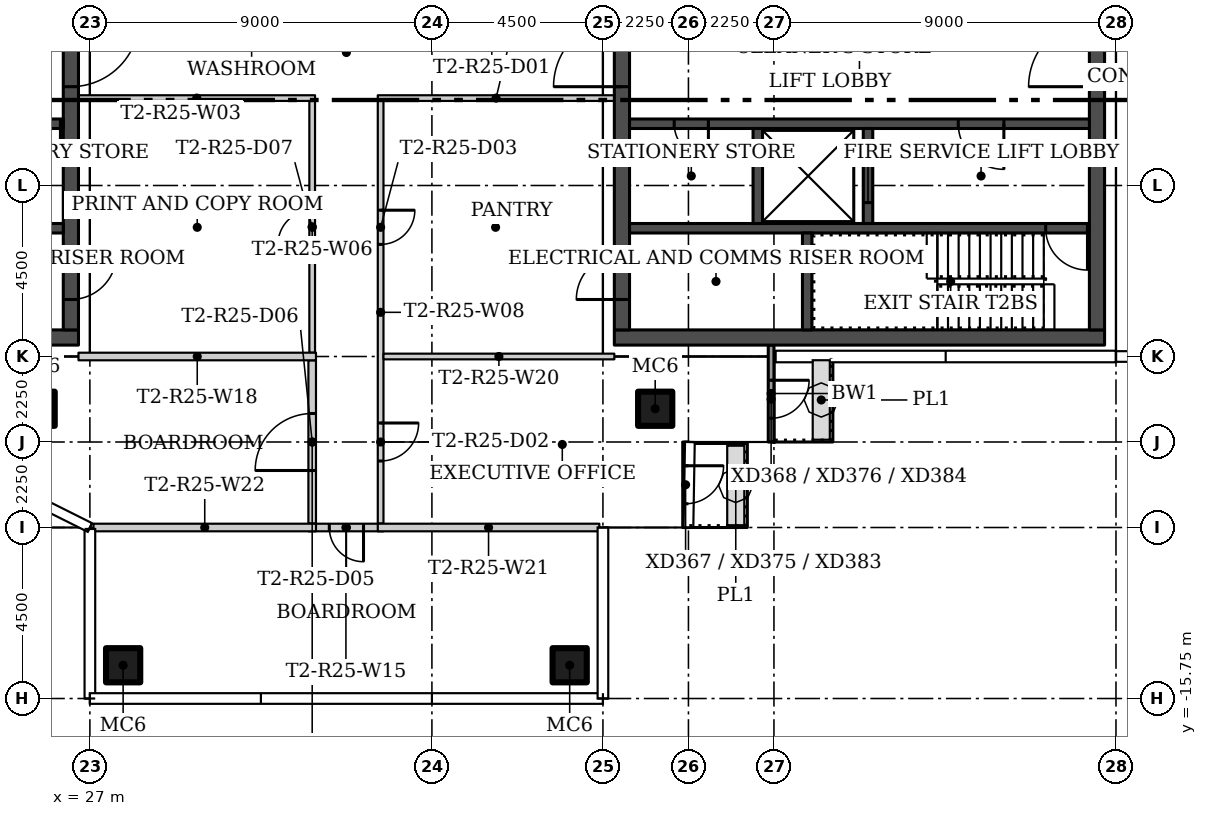
"""IFC4 building model, lengths in metres.
Left out: names, types, materials, properties, quantities, classifications, styles, units other than length and angle.
Written with IfcOpenShell. Run it as: python <this file> out.ifc"""

import sys

from ifc_helpers import new_model, si_unit, direction, frame, frame_2d, origin, origin_2d, place, context, subcontext, project, spatial, rectangle, hollow_rectangle, extrude, element, fill, save


model = new_model("IFC4")
c1 = context("Model", 3, precision=1e-05, world=origin(), true_north=direction((0.0, 1.0)))
c2 = subcontext(c1, "Body", "Model", "MODEL_VIEW")
j1 = project(units=[si_unit("LENGTHUNIT", "METRE"), si_unit("PLANEANGLEUNIT", "RADIAN")], contexts=[c1])
p1 = place(None, origin())
s1 = spatial("IfcSite", under=j1, at=p1, CompositionType="ELEMENT")
p2 = place(p1, origin())
s2 = spatial("IfcBuilding", under=s1, at=p2, CompositionType="ELEMENT")
p3 = place(p2, frame((0.0, 0.0, 230.4)))
s3 = spatial("IfcBuildingStorey", under=s2, at=p3, CompositionType="ELEMENT", Elevation=230.4)
for number, where in (
    (1, (25.625, -8.125, 0.0)),
    (2, (41.875, -8.125, 0.0)),
    (3, (39.625, -14.875, 0.0)),
    (4, (27.875, -14.875, 0.0)),
):
    element("IfcColumn", number, at=place(p3, frame(where)), inside=s3, PredefinedType="COLUMN", context=c2, shape_type="SweptSolid", body=[
        extrude(hollow_rectangle(XDim=0.9, YDim=0.9, WallThickness=0.036, at=origin_2d()), origin(), (0.0, 0.0, 1.0), 3.55),
    ])
for number, where, z_axis, x_axis in (
    (5, (32.925, 0.05, 0.0), (0.0, 0.0, 1.0), (-1.0, 0.0, 0.0)),
    (6, (40.8, 0.05, 0.0), (0.0, 0.0, 1.0), (-1.0, 0.0, 0.0)),
):
    element("IfcWall", number, at=place(p3, frame(where, z_axis=z_axis, x_axis=x_axis)), inside=s3, PredefinedType="PARTITIONING", context=c2, shape_type="SweptSolid", body=[
        extrude(rectangle(XDim=6.225, YDim=0.15, at=frame_2d((3.112, 0.0))), origin(), (0.0, 0.0, 1.0), 3.55),
    ])
p4 = place(p3, frame((32.85, -6.65, 0.0), z_axis=(0.0, 0.0, 1.0), x_axis=(0.0, 1.0, 0.0)))
e7 = element("IfcWall", 7, at=p4, inside=s3, PredefinedType="PARTITIONING", context=c2, shape_type="SweptSolid", body=[
    extrude(rectangle(XDim=6.625, YDim=0.15, at=frame_2d((3.312, 0.0))), origin(), (0.0, 0.0, 1.0), 3.55),
])
p5 = place(p4, frame((2.85, 0.0, 0.0)))
e8 = element("IfcOpeningElement", 8, at=p5, cuts=e7, PredefinedType="OPENING", context=c2, shape_type="SweptSolid", body=[
    extrude(rectangle(XDim=0.9, YDim=2.1, at=frame_2d((0.45, 1.05))), frame((0.0, 0.085, 0.0), z_axis=(0.0, -1.0, 0.0), x_axis=(1.0, 0.0, 0.0)), (0.0, 0.0, 1.0), 0.17),
])
p6 = place(p3, frame((34.65, -0.025, 0.0), z_axis=(0.0, 0.0, 1.0), x_axis=(0.0, -1.0, 0.0)))
e9 = element("IfcWall", 9, at=p6, inside=s3, PredefinedType="PARTITIONING", context=c2, shape_type="SweptSolid", body=[
    extrude(rectangle(XDim=11.125, YDim=0.15, at=frame_2d((5.562, 0.0))), origin(), (0.0, 0.0, 1.0), 3.55),
])
p7 = place(p6, frame((8.475, 0.0, 0.0)))
e10 = element("IfcOpeningElement", 10, at=p7, cuts=e9, PredefinedType="OPENING", context=c2, shape_type="SweptSolid", body=[
    extrude(rectangle(XDim=1.0, YDim=2.4, at=frame_2d((0.5, 1.2))), frame((0.0, 0.085, 0.0), z_axis=(0.0, -1.0, 0.0), x_axis=(1.0, 0.0, 0.0)), (0.0, 0.0, 1.0), 0.17),
])
p8 = place(p6, frame((2.875, 0.0, 0.0)))
e11 = element("IfcOpeningElement", 11, at=p8, cuts=e9, PredefinedType="OPENING", context=c2, shape_type="SweptSolid", body=[
    extrude(rectangle(XDim=0.9, YDim=2.1, at=frame_2d((0.45, 1.05))), frame((0.0, 0.085, 0.0), z_axis=(0.0, -1.0, 0.0), x_axis=(1.0, 0.0, 0.0)), (0.0, 0.0, 1.0), 0.17),
])
p9 = place(p3, frame((32.85, -11.15, 0.0), z_axis=(0.0, 0.0, 1.0), x_axis=(0.0, 1.0, 0.0)))
e12 = element("IfcWall", 12, at=p9, inside=s3, PredefinedType="PARTITIONING", context=c2, shape_type="SweptSolid", body=[
    extrude(rectangle(XDim=4.3, YDim=0.2, at=frame_2d((2.15, 0.0))), origin(), (0.0, 0.0, 1.0), 3.55),
])
p10 = place(p9, frame((1.4, 0.0, 0.0)))
e13 = element("IfcOpeningElement", 13, at=p10, cuts=e12, PredefinedType="OPENING", context=c2, shape_type="SweptSolid", body=[
    extrude(rectangle(XDim=1.5, YDim=2.4, at=frame_2d((0.75, 1.2))), frame((0.0, 0.11, 0.0), z_axis=(0.0, -1.0, 0.0), x_axis=(1.0, 0.0, 0.0)), (0.0, 0.0, 1.0), 0.22),
])
p11 = place(p3, frame((34.725, -11.25, 0.0), z_axis=(0.0, 0.0, 1.0), x_axis=(-1.0, 0.0, 0.0)))
e14 = element("IfcWall", 14, at=p11, inside=s3, PredefinedType="PARTITIONING", context=c2, shape_type="SweptSolid", body=[
    extrude(rectangle(XDim=1.976, YDim=0.2, at=frame_2d((0.988, 0.0))), origin(), (0.0, 0.0, 1.0), 3.55),
])
p12 = place(p11, frame((0.525, 0.0, 0.0)))
e15 = element("IfcOpeningElement", 15, at=p12, cuts=e14, PredefinedType="OPENING", context=c2, shape_type="SweptSolid", body=[
    extrude(rectangle(XDim=0.9, YDim=2.4, at=frame_2d((0.45, 1.2))), frame((0.0, 0.11, 0.0), z_axis=(0.0, -1.0, 0.0), x_axis=(1.0, 0.0, 0.0)), (0.0, 0.0, 1.0), 0.22),
])
p13 = place(p3, frame((26.7, -6.75, 0.0)))
e16 = element("IfcWall", 16, at=p13, inside=s3, PredefinedType="PARTITIONING", context=c2, shape_type="SweptSolid", body=[
    extrude(rectangle(XDim=6.25, YDim=0.2, at=frame_2d((3.125, 0.0))), origin(), (0.0, 0.0, 1.0), 3.55),
])
p14 = place(p3, frame((34.725, -6.75, 0.0)))
e17 = element("IfcWall", 17, at=p14, inside=s3, PredefinedType="PARTITIONING", context=c2, shape_type="SweptSolid", body=[
    extrude(rectangle(XDim=6.075, YDim=0.15, at=frame_2d((3.037, 0.0))), origin(), (0.0, 0.0, 1.0), 3.55),
])
p15 = place(p3, frame((34.575, -11.25, 0.0)))
e18 = element("IfcWall", 18, at=p15, inside=s3, PredefinedType="PARTITIONING", context=c2, shape_type="SweptSolid", body=[
    extrude(rectangle(XDim=5.83, YDim=0.2, at=frame_2d((2.915, 0.0))), origin(), (0.0, 0.0, 1.0), 3.55),
])
p16 = place(p3, frame((27.095, -11.25, 0.0)))
e19 = element("IfcWall", 19, at=p16, inside=s3, PredefinedType="PARTITIONING", context=c2, shape_type="SweptSolid", body=[
    extrude(rectangle(XDim=5.855, YDim=0.2, at=frame_2d((2.927, 0.0))), origin(), (0.0, 0.0, 1.0), 3.55),
])
p17 = place(p3, frame((42.675, -9.0, 0.0), z_axis=(0.0, 0.0, 1.0), x_axis=(0.0, -1.0, 0.0)))
e20 = element("IfcWall", 20, at=p17, inside=s3, PredefinedType="SOLIDWALL", context=c2, shape_type="SweptSolid", body=[
    extrude(rectangle(XDim=2.25, YDim=0.15, at=frame_2d((1.125, 0.0))), origin(), (0.0, 0.0, 1.0), 3.45),
])
p18 = place(p17, frame((0.625, 0.0, 0.0)))
e21 = element("IfcOpeningElement", 21, at=p18, cuts=e20, PredefinedType="OPENING", context=c2, shape_type="SweptSolid", body=[
    extrude(rectangle(XDim=1.0, YDim=2.4, at=frame_2d((0.5, 1.2))), frame((0.0, 0.085, 0.0), z_axis=(0.0, -1.0, 0.0), x_axis=(1.0, 0.0, 0.0)), (0.0, 0.0, 1.0), 0.17),
])
p19 = place(p3, frame((44.925, -6.448, 0.0), z_axis=(0.0, 0.0, 1.0), x_axis=(0.0, -1.0, 0.0)))
e22 = element("IfcWall", 22, at=p19, inside=s3, PredefinedType="SOLIDWALL", context=c2, shape_type="SweptSolid", body=[
    extrude(rectangle(XDim=2.552, YDim=0.15, at=frame_2d((1.276, 0.0))), origin(), (0.0, 0.0, 1.0), 3.45),
])
p20 = place(p19, frame((0.927, 0.0, 0.0)))
e23 = element("IfcOpeningElement", 23, at=p20, cuts=e22, PredefinedType="OPENING", context=c2, shape_type="SweptSolid", body=[
    extrude(rectangle(XDim=1.0, YDim=2.4, at=frame_2d((0.5, 1.2))), frame((0.0, 0.085, 0.0), z_axis=(0.0, -1.0, 0.0), x_axis=(1.0, 0.0, 0.0)), (0.0, 0.0, 1.0), 0.17),
])
p21 = place(p3, frame((13.8, -6.25, 0.0)))
e24 = element("IfcWall", 24, at=p21, inside=s3, PredefinedType="SHEAR", context=c2, shape_type="SweptSolid", body=[
    extrude(rectangle(XDim=12.9, YDim=0.4, at=frame_2d((6.45, 0.0))), origin(), (0.0, 0.0, 1.0), 3.55),
])
p22 = place(p3, frame((26.5, 6.05, 0.0), z_axis=(0.0, 0.0, 1.0), x_axis=(0.0, -1.0, 0.0)))
e25 = element("IfcWall", 25, at=p22, inside=s3, PredefinedType="SHEAR", context=c2, shape_type="SweptSolid", body=[
    extrude(rectangle(XDim=12.1, YDim=0.4, at=frame_2d((6.05, 0.0))), origin(), (0.0, 0.0, 1.0), 3.55),
])
p23 = place(p22, frame((10.1, 0.0, 0.0)))
e26 = element("IfcOpeningElement", 26, at=p23, cuts=e25, PredefinedType="OPENING", context=c2, shape_type="SweptSolid", body=[
    extrude(rectangle(XDim=1.2, YDim=2.1, at=frame_2d((0.6, 1.05))), frame((0.0, 0.21, 0.0), z_axis=(0.0, -1.0, 0.0), x_axis=(1.0, 0.0, 0.0)), (0.0, 0.0, 1.0), 0.42),
])
p24 = place(p22, frame((3.9, 0.0, 0.0)))
e27 = element("IfcOpeningElement", 27, at=p24, cuts=e25, PredefinedType="OPENING", context=c2, shape_type="SweptSolid", body=[
    extrude(rectangle(XDim=1.8, YDim=2.4, at=frame_2d((0.9, 1.2))), frame((0.0, 0.21, 0.0), z_axis=(0.0, -1.0, 0.0), x_axis=(1.0, 0.0, 0.0)), (0.0, 0.0, 1.0), 0.42),
])
p25 = place(p3, frame((26.3, -3.375, 0.0), z_axis=(0.0, 0.0, 1.0), x_axis=(-1.0, 0.0, 0.0)))
e28 = element("IfcWall", 28, at=p25, inside=s3, PredefinedType="SHEAR", context=c2, shape_type="SweptSolid", body=[
    extrude(rectangle(XDim=12.1, YDim=0.25, at=frame_2d((6.05, 0.0))), origin(), (0.0, 0.0, 1.0), 3.55),
])
p26 = place(p25, frame((10.95, 0.0, 0.0)))
e29 = element("IfcOpeningElement", 29, at=p26, cuts=e28, PredefinedType="OPENING", context=c2, shape_type="SweptSolid", body=[
    extrude(rectangle(XDim=1.1, YDim=2.1, at=frame_2d((0.55, 1.05))), frame((0.0, 0.135, 0.0), z_axis=(0.0, -1.0, 0.0), x_axis=(1.0, 0.0, 0.0)), (0.0, 0.0, 1.0), 0.27),
])
p27 = place(p3, frame((26.3, -0.625, 0.0), z_axis=(0.0, 0.0, 1.0), x_axis=(-1.0, 0.0, 0.0)))
e30 = element("IfcWall", 30, at=p27, inside=s3, PredefinedType="SHEAR", context=c2, shape_type="SweptSolid", body=[
    extrude(rectangle(XDim=12.1, YDim=0.25, at=frame_2d((6.05, 0.0))), origin(), (0.0, 0.0, 1.0), 3.55),
])
p28 = place(p27, frame((8.65, 0.0, 0.0)))
e31 = element("IfcOpeningElement", 31, at=p28, cuts=e30, PredefinedType="OPENING", context=c2, shape_type="SweptSolid", body=[
    extrude(rectangle(XDim=1.2, YDim=2.1, at=frame_2d((0.6, 1.05))), frame((0.0, 0.135, 0.0), z_axis=(0.0, -1.0, 0.0), x_axis=(1.0, 0.0, 0.0)), (0.0, 0.0, 1.0), 0.27),
])
p29 = place(p27, frame((1.7, 0.0, 0.0)))
e32 = element("IfcOpeningElement", 32, at=p29, cuts=e30, PredefinedType="OPENING", context=c2, shape_type="SweptSolid", body=[
    extrude(rectangle(XDim=0.9, YDim=2.1, at=frame_2d((0.45, 1.05))), frame((0.0, 0.135, 0.0), z_axis=(0.0, -1.0, 0.0), x_axis=(1.0, 0.0, 0.0)), (0.0, 0.0, 1.0), 0.27),
])
p30 = place(p27, frame((0.075, 0.0, 0.0)))
e33 = element("IfcOpeningElement", 33, at=p30, cuts=e30, PredefinedType="OPENING", context=c2, shape_type="SweptSolid", body=[
    extrude(rectangle(XDim=0.9, YDim=2.1, at=frame_2d((0.45, 1.05))), frame((0.0, 0.135, 0.0), z_axis=(0.0, -1.0, 0.0), x_axis=(1.0, 0.0, 0.0)), (0.0, 0.0, 1.0), 0.27),
])
p31 = place(p3, frame((53.7, -6.25, 0.0), z_axis=(0.0, 0.0, 1.0), x_axis=(-1.0, 0.0, 0.0)))
e34 = element("IfcWall", 34, at=p31, inside=s3, PredefinedType="SHEAR", context=c2, shape_type="SweptSolid", body=[
    extrude(rectangle(XDim=12.9, YDim=0.4, at=frame_2d((6.45, 0.0))), origin(), (0.0, 0.0, 1.0), 3.55),
])
p32 = place(p3, frame((53.5, -6.05, 0.0), z_axis=(0.0, 0.0, 1.0), x_axis=(0.0, 1.0, 0.0)))
e35 = element("IfcWall", 35, at=p32, inside=s3, PredefinedType="SHEAR", context=c2, shape_type="SweptSolid", body=[
    extrude(rectangle(XDim=12.1, YDim=0.4, at=frame_2d((6.05, 0.0))), origin(), (0.0, 0.0, 1.0), 3.55),
])
p33 = place(p32, frame((6.4, 0.0, 0.0)))
e36 = element("IfcOpeningElement", 36, at=p33, cuts=e35, PredefinedType="OPENING", context=c2, shape_type="SweptSolid", body=[
    extrude(rectangle(XDim=1.8, YDim=2.4, at=frame_2d((0.9, 1.2))), frame((0.0, 0.21, 0.0), z_axis=(0.0, -1.0, 0.0), x_axis=(1.0, 0.0, 0.0)), (0.0, 0.0, 1.0), 0.42),
])
p34 = place(p3, frame((41.0, -6.05, 0.0), z_axis=(0.0, 0.0, 1.0), x_axis=(0.0, 1.0, 0.0)))
e37 = element("IfcWall", 37, at=p34, inside=s3, PredefinedType="SHEAR", context=c2, shape_type="SweptSolid", body=[
    extrude(rectangle(XDim=12.1, YDim=0.4, at=frame_2d((6.05, 0.0))), origin(), (0.0, 0.0, 1.0), 3.55),
])
p35 = place(p34, frame((0.8, 0.0, 0.0)))
e38 = element("IfcOpeningElement", 38, at=p35, cuts=e37, PredefinedType="OPENING", context=c2, shape_type="SweptSolid", body=[
    extrude(rectangle(XDim=1.2, YDim=2.1, at=frame_2d((0.6, 1.05))), frame((0.0, 0.21, 0.0), z_axis=(0.0, -1.0, 0.0), x_axis=(1.0, 0.0, 0.0)), (0.0, 0.0, 1.0), 0.42),
])
p36 = place(p34, frame((6.4, 0.0, 0.0)))
e39 = element("IfcOpeningElement", 39, at=p36, cuts=e37, PredefinedType="OPENING", context=c2, shape_type="SweptSolid", body=[
    extrude(rectangle(XDim=1.8, YDim=2.4, at=frame_2d((0.9, 1.2))), frame((0.0, 0.21, 0.0), z_axis=(0.0, -1.0, 0.0), x_axis=(1.0, 0.0, 0.0)), (0.0, 0.0, 1.0), 0.42),
])
p37 = place(p3, frame((53.3, -3.375, 0.0), z_axis=(0.0, 0.0, 1.0), x_axis=(-1.0, 0.0, 0.0)))
e40 = element("IfcWall", 40, at=p37, inside=s3, PredefinedType="SHEAR", context=c2, shape_type="SweptSolid", body=[
    extrude(rectangle(XDim=12.1, YDim=0.25, at=frame_2d((6.05, 0.0))), origin(), (0.0, 0.0, 1.0), 3.55),
])
p38 = place(p37, frame((0.05, 0.0, 0.0)))
e41 = element("IfcOpeningElement", 41, at=p38, cuts=e40, PredefinedType="OPENING", context=c2, shape_type="SweptSolid", body=[
    extrude(rectangle(XDim=1.1, YDim=2.1, at=frame_2d((0.55, 1.05))), frame((0.0, 0.135, 0.0), z_axis=(0.0, -1.0, 0.0), x_axis=(1.0, 0.0, 0.0)), (0.0, 0.0, 1.0), 0.27),
])
p39 = place(p3, frame((45.875, -6.05, 0.0), z_axis=(0.0, 0.0, 1.0), x_axis=(0.0, 1.0, 0.0)))
e42 = element("IfcWall", 42, at=p39, inside=s3, PredefinedType="SHEAR", context=c2, shape_type="SweptSolid", body=[
    extrude(rectangle(XDim=2.55, YDim=0.25, at=frame_2d((1.275, 0.0))), origin(), (0.0, 0.0, 1.0), 3.55),
])
p40 = place(p3, frame((53.3, -0.625, 0.0), z_axis=(0.0, 0.0, 1.0), x_axis=(-1.0, 0.0, 0.0)))
e43 = element("IfcWall", 43, at=p40, inside=s3, PredefinedType="SHEAR", context=c2, shape_type="SweptSolid", body=[
    extrude(rectangle(XDim=12.1, YDim=0.25, at=frame_2d((6.05, 0.0))), origin(), (0.0, 0.0, 1.0), 3.55),
])
p41 = place(p40, frame((2.25, 0.0, 0.0)))
e44 = element("IfcOpeningElement", 44, at=p41, cuts=e43, PredefinedType="OPENING", context=c2, shape_type="SweptSolid", body=[
    extrude(rectangle(XDim=1.2, YDim=2.1, at=frame_2d((0.6, 1.05))), frame((0.0, 0.135, 0.0), z_axis=(0.0, -1.0, 0.0), x_axis=(1.0, 0.0, 0.0)), (0.0, 0.0, 1.0), 0.27),
])
p42 = place(p40, frame((10.025, 0.0, 0.0)))
e45 = element("IfcOpeningElement", 45, at=p42, cuts=e43, PredefinedType="OPENING", context=c2, shape_type="SweptSolid", body=[
    extrude(rectangle(XDim=0.9, YDim=2.1, at=frame_2d((0.45, 1.05))), frame((0.0, 0.135, 0.0), z_axis=(0.0, -1.0, 0.0), x_axis=(1.0, 0.0, 0.0)), (0.0, 0.0, 1.0), 0.27),
])
p43 = place(p3, frame((47.475, -3.25, 0.0), z_axis=(0.0, 0.0, 1.0), x_axis=(0.0, 1.0, 0.0)))
e46 = element("IfcWall", 46, at=p43, inside=s3, PredefinedType="SHEAR", context=c2, shape_type="SweptSolid", body=[
    extrude(rectangle(XDim=2.5, YDim=0.25, at=frame_2d((1.25, 0.0))), origin(), (0.0, 0.0, 1.0), 3.55),
])
p44 = place(p43, frame((0.55, 0.0, 0.0)))
e47 = element("IfcOpeningElement", 47, at=p44, cuts=e46, PredefinedType="OPENING", context=c2, shape_type="SweptSolid", body=[
    extrude(rectangle(XDim=1.4, YDim=2.4, at=frame_2d((0.7, 1.2))), frame((0.0, 0.135, 0.0), z_axis=(0.0, -1.0, 0.0), x_axis=(1.0, 0.0, 0.0)), (0.0, 0.0, 1.0), 0.27),
])
p45 = place(p3, frame((44.575, -3.25, 0.0), z_axis=(0.0, 0.0, 1.0), x_axis=(0.0, 1.0, 0.0)))
e48 = element("IfcWall", 48, at=p45, inside=s3, PredefinedType="SHEAR", context=c2, shape_type="SweptSolid", body=[
    extrude(rectangle(XDim=2.5, YDim=0.25, at=frame_2d((1.25, 0.0))), origin(), (0.0, 0.0, 1.0), 3.55),
])
p46 = place(p7, origin())
e49 = element("IfcDoor", 49, at=p46, inside=s3, OperationType="SINGLE_SWING_LEFT", PredefinedType="DOOR", context=c2, shape_type="SweptSolid", body=[
    extrude(rectangle(XDim=1.0, YDim=2.4, at=frame_2d((0.5, 1.2))), frame((0.0, 0.025, 0.0), z_axis=(0.0, -1.0, 0.0), x_axis=(1.0, 0.0, 0.0)), (0.0, 0.0, 1.0), 0.05),
])
fill(e10, e49)
p47 = place(p8, origin())
e50 = element("IfcDoor", 50, at=p47, inside=s3, OperationType="SINGLE_SWING_RIGHT", PredefinedType="DOOR", context=c2, shape_type="SweptSolid", body=[
    extrude(rectangle(XDim=0.9, YDim=2.1, at=frame_2d((0.45, 1.05))), frame((0.0, 0.025, 0.0), z_axis=(0.0, -1.0, 0.0), x_axis=(1.0, 0.0, 0.0)), (0.0, 0.0, 1.0), 0.05),
])
fill(e11, e50)
p48 = place(p12, origin())
e51 = element("IfcDoor", 51, at=p48, inside=s3, OperationType="SINGLE_SWING_RIGHT", PredefinedType="DOOR", context=c2, shape_type="SweptSolid", body=[
    extrude(rectangle(XDim=0.9, YDim=2.4, at=frame_2d((0.45, 1.2))), frame((0.0, 0.025, 0.0), z_axis=(0.0, -1.0, 0.0), x_axis=(1.0, 0.0, 0.0)), (0.0, 0.0, 1.0), 0.05),
])
fill(e15, e51)
p49 = place(p10, origin())
e52 = element("IfcDoor", 52, at=p49, inside=s3, OperationType="DOUBLE_DOOR_SINGLE_SWING", PredefinedType="DOOR", context=c2, shape_type="SweptSolid", body=[
    extrude(rectangle(XDim=1.5, YDim=2.4, at=frame_2d((0.75, 1.2))), frame((0.0, 0.025, 0.0), z_axis=(0.0, -1.0, 0.0), x_axis=(1.0, 0.0, 0.0)), (0.0, 0.0, 1.0), 0.05),
])
fill(e13, e52)
p50 = place(p5, origin())
e53 = element("IfcDoor", 53, at=p50, inside=s3, OperationType="SINGLE_SWING_RIGHT", PredefinedType="DOOR", context=c2, shape_type="SweptSolid", body=[
    extrude(rectangle(XDim=0.9, YDim=2.1, at=frame_2d((0.45, 1.05))), frame((0.0, 0.025, 0.0), z_axis=(0.0, -1.0, 0.0), x_axis=(1.0, 0.0, 0.0)), (0.0, 0.0, 1.0), 0.05),
])
fill(e8, e53)
p51 = place(p18, origin())
e54 = element("IfcDoor", 54, at=p51, inside=s3, OperationType="SINGLE_SWING_LEFT", PredefinedType="DOOR", context=c2, shape_type="SweptSolid", body=[
    extrude(rectangle(XDim=1.0, YDim=2.4, at=frame_2d((0.5, 1.2))), frame((0.0, 0.025, 0.0), z_axis=(0.0, -1.0, 0.0), x_axis=(1.0, 0.0, 0.0)), (0.0, 0.0, 1.0), 0.05),
])
fill(e21, e54)
p52 = place(p20, origin())
e55 = element("IfcDoor", 55, at=p52, inside=s3, OperationType="SINGLE_SWING_RIGHT", PredefinedType="DOOR", context=c2, shape_type="SweptSolid", body=[
    extrude(rectangle(XDim=1.0, YDim=2.4, at=frame_2d((0.5, 1.2))), frame((0.0, 0.025, 0.0), z_axis=(0.0, -1.0, 0.0), x_axis=(1.0, 0.0, 0.0)), (0.0, 0.0, 1.0), 0.05),
])
fill(e23, e55)
p53 = place(p23, origin())
e56 = element("IfcDoor", 56, at=p53, inside=s3, OperationType="SINGLE_SWING_RIGHT", PredefinedType="DOOR", context=c2, shape_type="SweptSolid", body=[
    extrude(rectangle(XDim=1.2, YDim=2.1, at=frame_2d((0.6, 1.05))), frame((0.0, 0.025, 0.0), z_axis=(0.0, -1.0, 0.0), x_axis=(1.0, 0.0, 0.0)), (0.0, 0.0, 1.0), 0.05),
])
fill(e26, e56)
p54 = place(p24, origin())
e57 = element("IfcDoor", 57, at=p54, inside=s3, OperationType="DOUBLE_DOOR_SINGLE_SWING", PredefinedType="DOOR", context=c2, shape_type="SweptSolid", body=[
    extrude(rectangle(XDim=1.8, YDim=2.4, at=frame_2d((0.9, 1.2))), frame((0.0, 0.025, 0.0), z_axis=(0.0, -1.0, 0.0), x_axis=(1.0, 0.0, 0.0)), (0.0, 0.0, 1.0), 0.05),
])
fill(e27, e57)
p55 = place(p30, origin())
e58 = element("IfcDoor", 58, at=p55, inside=s3, OperationType="SINGLE_SWING_LEFT", PredefinedType="DOOR", context=c2, shape_type="SweptSolid", body=[
    extrude(rectangle(XDim=0.9, YDim=2.1, at=frame_2d((0.45, 1.05))), frame((0.0, 0.025, 0.0), z_axis=(0.0, -1.0, 0.0), x_axis=(1.0, 0.0, 0.0)), (0.0, 0.0, 1.0), 0.05),
])
fill(e33, e58)
p56 = place(p33, origin())
e59 = element("IfcDoor", 59, at=p56, inside=s3, OperationType="DOUBLE_DOOR_SINGLE_SWING", PredefinedType="DOOR", context=c2, shape_type="SweptSolid", body=[
    extrude(rectangle(XDim=1.8, YDim=2.4, at=frame_2d((0.9, 1.2))), frame((0.0, 0.025, 0.0), z_axis=(0.0, -1.0, 0.0), x_axis=(1.0, 0.0, 0.0)), (0.0, 0.0, 1.0), 0.05),
])
fill(e36, e59)
p57 = place(p35, origin())
e60 = element("IfcDoor", 60, at=p57, inside=s3, OperationType="SINGLE_SWING_LEFT", PredefinedType="DOOR", context=c2, shape_type="SweptSolid", body=[
    extrude(rectangle(XDim=1.2, YDim=2.1, at=frame_2d((0.6, 1.05))), frame((0.0, 0.025, 0.0), z_axis=(0.0, -1.0, 0.0), x_axis=(1.0, 0.0, 0.0)), (0.0, 0.0, 1.0), 0.05),
])
fill(e38, e60)
p58 = place(p36, origin())
e61 = element("IfcDoor", 61, at=p58, inside=s3, OperationType="DOUBLE_DOOR_SINGLE_SWING", PredefinedType="DOOR", context=c2, shape_type="SweptSolid", body=[
    extrude(rectangle(XDim=1.8, YDim=2.4, at=frame_2d((0.9, 1.2))), frame((0.0, 0.025, 0.0), z_axis=(0.0, -1.0, 0.0), x_axis=(1.0, 0.0, 0.0)), (0.0, 0.0, 1.0), 0.05),
])
fill(e39, e61)
p59 = place(p38, origin())
e62 = element("IfcDoor", 62, at=p59, inside=s3, OperationType="SINGLE_SWING_LEFT", PredefinedType="DOOR", context=c2, shape_type="SweptSolid", body=[
    extrude(rectangle(XDim=1.1, YDim=2.1, at=frame_2d((0.55, 1.05))), frame((0.0, 0.025, 0.0), z_axis=(0.0, -1.0, 0.0), x_axis=(1.0, 0.0, 0.0)), (0.0, 0.0, 1.0), 0.05),
])
fill(e41, e62)
p60 = place(p41, origin())
e63 = element("IfcDoor", 63, at=p60, inside=s3, OperationType="SINGLE_SWING_LEFT", PredefinedType="DOOR", context=c2, shape_type="SweptSolid", body=[
    extrude(rectangle(XDim=1.2, YDim=2.1, at=frame_2d((0.6, 1.05))), frame((0.0, 0.025, 0.0), z_axis=(0.0, -1.0, 0.0), x_axis=(1.0, 0.0, 0.0)), (0.0, 0.0, 1.0), 0.05),
])
fill(e44, e63)
p61 = place(p42, origin())
e64 = element("IfcDoor", 64, at=p61, inside=s3, OperationType="SINGLE_SWING_RIGHT", PredefinedType="DOOR", context=c2, shape_type="SweptSolid", body=[
    extrude(rectangle(XDim=0.9, YDim=2.1, at=frame_2d((0.45, 1.05))), frame((0.0, 0.025, 0.0), z_axis=(0.0, -1.0, 0.0), x_axis=(1.0, 0.0, 0.0)), (0.0, 0.0, 1.0), 0.05),
])
fill(e45, e64)
p62 = place(p44, origin())
e65 = element("IfcDoor", 65, at=p62, inside=s3, OperationType="SLIDING_TO_LEFT", PredefinedType="DOOR", context=c2, shape_type="SweptSolid", body=[
    extrude(rectangle(XDim=1.4, YDim=2.4, at=frame_2d((0.7, 1.2))), frame((0.0, 0.025, 0.0), z_axis=(0.0, -1.0, 0.0), x_axis=(1.0, 0.0, 0.0)), (0.0, 0.0, 1.0), 0.05),
])
fill(e47, e65)
save(model, sys.argv[1])
